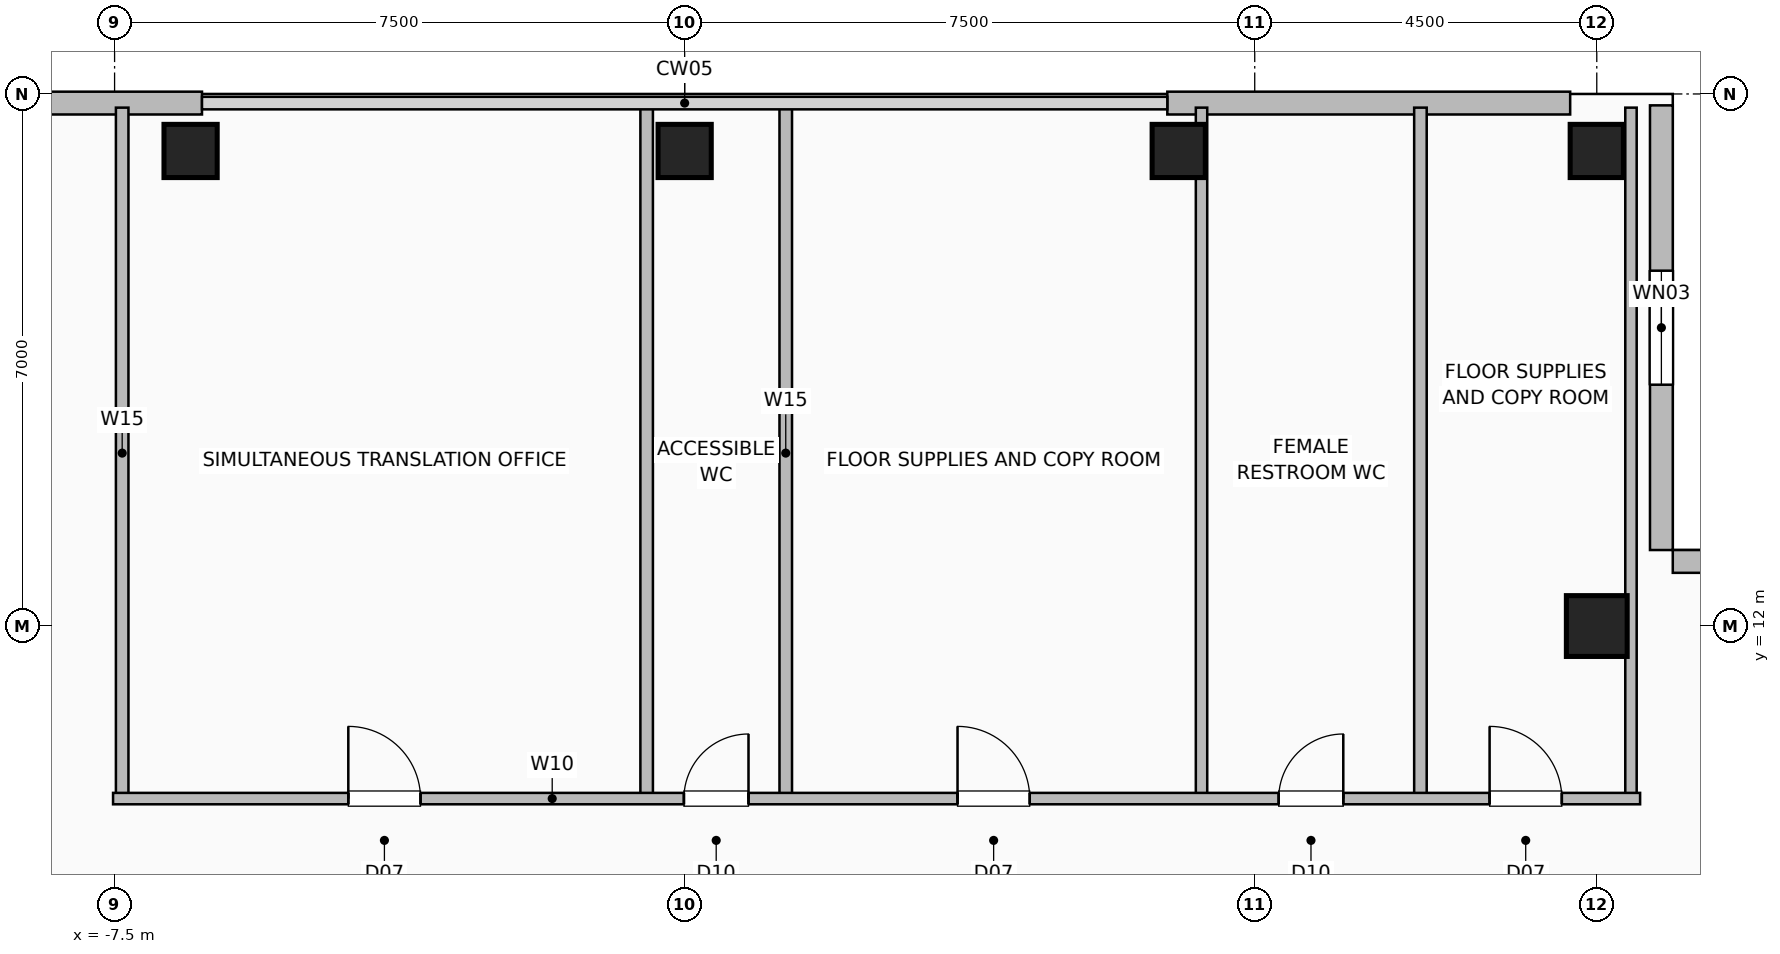
"""IFC4 building model, lengths in metres.
Left out: names, types, materials, properties, quantities, classifications, styles, units other than length and angle.
Written with IfcOpenShell. Run it as: python <this file> out.ifc"""

import sys

from ifc_helpers import new_model, si_unit, direction, frame, frame_2d, origin, origin_2d, place, context, subcontext, project, spatial, rectangle, hollow_rectangle, extrude, element, fill, save


model = new_model("IFC4")
c1 = context("Model", 3, precision=1e-05, world=origin(), true_north=direction((0.0, 1.0)))
c2 = subcontext(c1, "Body", "Model", "MODEL_VIEW")
j1 = project(units=[si_unit("LENGTHUNIT", "METRE"), si_unit("PLANEANGLEUNIT", "RADIAN")], contexts=[c1])
p1 = place(None, origin())
s1 = spatial("IfcSite", under=j1, at=p1, CompositionType="ELEMENT")
p2 = place(p1, origin())
s2 = spatial("IfcBuilding", under=s1, at=p2, CompositionType="ELEMENT")
p3 = place(p2, frame((0.0, 0.0, 246.8)))
s3 = spatial("IfcBuildingStorey", under=s2, at=p3, CompositionType="ELEMENT", Elevation=246.8)
for number, where, z_axis, x_axis in (
    (1, (-6.5, 18.25, 0.0), (0.0, 0.0, 1.0), (1.0, 0.0, 0.0)),
    (2, (0.0, 18.25, 0.0), (0.0, 0.0, 1.0), (1.0, 0.0, 0.0)),
    (3, (6.5, 18.25, 0.0), (0.0, 0.0, 1.0), (1.0, 0.0, 0.0)),
    (4, (12.0, 18.25, 0.0), (0.0, 0.0, 1.0), (1.0, 0.0, 0.0)),
):
    element("IfcColumn", number, at=place(p3, frame(where, z_axis=z_axis, x_axis=x_axis)), inside=s3, PredefinedType="COLUMN", context=c2, shape_type="SweptSolid", body=[
        extrude(hollow_rectangle(XDim=0.7, YDim=0.7, WallThickness=0.035, at=origin_2d()), origin(), (0.0, 0.0, 1.0), 3.6),
    ])
p4 = place(p3, frame((12.0, 12.0, 0.0), z_axis=(0.0, 0.0, 1.0), x_axis=(1.0, 0.0, 0.0)))
e5 = element("IfcColumn", 5, at=p4, inside=s3, PredefinedType="COLUMN", context=c2, shape_type="SweptSolid", body=[
    extrude(hollow_rectangle(XDim=0.8, YDim=0.8, WallThickness=0.04, at=origin_2d()), origin(), (0.0, 0.0, 1.0), 3.6),
])
for number, where, z_axis, x_axis in (
    (6, (-11.65, 18.88, 0.0), (0.0, 0.0, 1.0), (1.0, 0.0, 0.0)),
    (7, (6.35, 18.88, 0.0), (0.0, 0.0, 1.0), (1.0, 0.0, 0.0)),
):
    element("IfcWall", number, at=place(p3, frame(where, z_axis=z_axis, x_axis=x_axis)), inside=s3, PredefinedType="SOLIDWALL", context=c2, shape_type="SweptSolid", body=[
        extrude(rectangle(XDim=5.3, YDim=0.3, at=frame_2d((2.65, 0.0))), origin(), (0.0, 0.0, 1.0), 3.36),
    ])
p5 = place(p3, frame((12.85, 18.85, 0.0), z_axis=(0.0, 0.0, 1.0), x_axis=(0.0, -1.0, 0.0)))
e8 = element("IfcWall", 8, at=p5, inside=s3, PredefinedType="SOLIDWALL", context=c2, shape_type="SweptSolid", body=[
    extrude(rectangle(XDim=5.85, YDim=0.3, at=frame_2d((2.925, 0.0))), origin(), (0.0, 0.0, 1.0), 3.36),
])
p6 = place(p5, frame((2.175, 0.0, 0.9)))
e9 = element("IfcOpeningElement", 9, at=p6, cuts=e8, PredefinedType="OPENING", context=c2, shape_type="SweptSolid", body=[
    extrude(rectangle(XDim=1.5, YDim=1.8, at=frame_2d((0.75, 0.9))), frame((0.0, 0.16, 0.0), z_axis=(0.0, -1.0, 0.0), x_axis=(1.0, 0.0, 0.0)), (0.0, 0.0, 1.0), 0.32),
])
p7 = place(p3, frame((18.85, 12.85, 0.0), z_axis=(0.0, 0.0, 1.0), x_axis=(-1.0, 0.0, 0.0)))
e10 = element("IfcWall", 10, at=p7, inside=s3, PredefinedType="SOLIDWALL", context=c2, shape_type="SweptSolid", body=[
    extrude(rectangle(XDim=5.85, YDim=0.3, at=frame_2d((2.925, 0.0))), origin(), (0.0, 0.0, 1.0), 3.36),
])
for number, where, z_axis, x_axis in (
    (11, (1.33, 9.73, 0.0), (0.0, 0.0, 1.0), (0.0, 1.0, 0.0)),
    (12, (9.68, 9.73, 0.0), (0.0, 0.0, 1.0), (0.0, 1.0, 0.0)),
    (13, (-7.4, 9.73, 0.0), (0.0, 0.0, 1.0), (0.0, 1.0, 0.0)),
    (14, (-0.5, 9.73, 0.0), (0.0, 0.0, 1.0), (0.0, 1.0, 0.0)),
):
    element("IfcWall", number, at=place(p3, frame(where, z_axis=z_axis, x_axis=x_axis)), inside=s3, PredefinedType="PLUMBINGWALL", context=c2, shape_type="SweptSolid", body=[
        extrude(rectangle(XDim=9.09, YDim=0.165, at=frame_2d((4.545, 0.0))), origin(), (0.0, 0.0, 1.0), 3.36),
    ])
for number, where, z_axis, x_axis in (
    (15, (6.8, 9.73, 0.0), (0.0, 0.0, 1.0), (0.0, 1.0, 0.0)),
    (16, (12.45, 9.73, 0.0), (0.0, 0.0, 1.0), (0.0, 1.0, 0.0)),
):
    element("IfcWall", number, at=place(p3, frame(where, z_axis=z_axis, x_axis=x_axis)), inside=s3, PredefinedType="PARTITIONING", context=c2, shape_type="SweptSolid", body=[
        extrude(rectangle(XDim=9.09, YDim=0.15, at=frame_2d((4.545, 0.0))), origin(), (0.0, 0.0, 1.0), 3.36),
    ])
p8 = place(p3, frame((-7.52, 9.73, 0.0), z_axis=(0.0, 0.0, 1.0), x_axis=(1.0, 0.0, 0.0)))
e17 = element("IfcWall", 17, at=p8, inside=s3, PredefinedType="PARTITIONING", context=c2, shape_type="SweptSolid", body=[
    extrude(rectangle(XDim=20.09, YDim=0.15, at=frame_2d((10.045, 0.0))), origin(), (0.0, 0.0, 1.0), 3.36),
])
p9 = place(p8, frame((3.095, 0.0, 0.0)))
e18 = element("IfcOpeningElement", 18, at=p9, cuts=e17, PredefinedType="OPENING", context=c2, shape_type="SweptSolid", body=[
    extrude(rectangle(XDim=0.95, YDim=2.06, at=frame_2d((0.475, 1.03))), frame((0.0, 0.085, 0.0), z_axis=(0.0, -1.0, 0.0), x_axis=(1.0, 0.0, 0.0)), (0.0, 0.0, 1.0), 0.17),
])
p10 = place(p8, frame((7.51, 0.0, 0.0)))
e19 = element("IfcOpeningElement", 19, at=p10, cuts=e17, PredefinedType="OPENING", context=c2, shape_type="SweptSolid", body=[
    extrude(rectangle(XDim=0.85, YDim=2.05, at=frame_2d((0.425, 1.025))), frame((0.0, 0.085, 0.0), z_axis=(0.0, -1.0, 0.0), x_axis=(1.0, 0.0, 0.0)), (0.0, 0.0, 1.0), 0.17),
])
p11 = place(p8, frame((11.11, 0.0, 0.0)))
e20 = element("IfcOpeningElement", 20, at=p11, cuts=e17, PredefinedType="OPENING", context=c2, shape_type="SweptSolid", body=[
    extrude(rectangle(XDim=0.95, YDim=2.06, at=frame_2d((0.475, 1.03))), frame((0.0, 0.085, 0.0), z_axis=(0.0, -1.0, 0.0), x_axis=(1.0, 0.0, 0.0)), (0.0, 0.0, 1.0), 0.17),
])
p12 = place(p8, frame((15.335, 0.0, 0.0)))
e21 = element("IfcOpeningElement", 21, at=p12, cuts=e17, PredefinedType="OPENING", context=c2, shape_type="SweptSolid", body=[
    extrude(rectangle(XDim=0.85, YDim=2.05, at=frame_2d((0.425, 1.025))), frame((0.0, 0.085, 0.0), z_axis=(0.0, -1.0, 0.0), x_axis=(1.0, 0.0, 0.0)), (0.0, 0.0, 1.0), 0.17),
])
p13 = place(p8, frame((18.11, 0.0, 0.0)))
e22 = element("IfcOpeningElement", 22, at=p13, cuts=e17, PredefinedType="OPENING", context=c2, shape_type="SweptSolid", body=[
    extrude(rectangle(XDim=0.95, YDim=2.06, at=frame_2d((0.475, 1.03))), frame((0.0, 0.085, 0.0), z_axis=(0.0, -1.0, 0.0), x_axis=(1.0, 0.0, 0.0)), (0.0, 0.0, 1.0), 0.17),
])
p14 = place(p6, origin())
e23 = element("IfcWindow", 23, at=p14, inside=s3, PartitioningType="SINGLE_PANEL", PredefinedType="WINDOW", context=c2, shape_type="SweptSolid", body=[
    extrude(rectangle(XDim=1.5, YDim=1.8, at=frame_2d((0.75, 0.9))), frame((0.0, 0.03, 0.0), z_axis=(0.0, -1.0, 0.0), x_axis=(1.0, 0.0, 0.0)), (0.0, 0.0, 1.0), 0.06),
])
fill(e9, e23)
p15 = place(p9, origin())
e24 = element("IfcDoor", 24, at=p15, inside=s3, OperationType="SINGLE_SWING_LEFT", PredefinedType="DOOR", context=c2, shape_type="SweptSolid", body=[
    extrude(rectangle(XDim=0.95, YDim=2.06, at=frame_2d((0.475, 1.03))), frame((0.0, 0.025, 0.0), z_axis=(0.0, -1.0, 0.0), x_axis=(1.0, 0.0, 0.0)), (0.0, 0.0, 1.0), 0.05),
])
fill(e18, e24)
p16 = place(p10, origin())
e25 = element("IfcDoor", 25, at=p16, inside=s3, OperationType="SINGLE_SWING_RIGHT", PredefinedType="DOOR", context=c2, shape_type="SweptSolid", body=[
    extrude(rectangle(XDim=0.85, YDim=2.05, at=frame_2d((0.425, 1.025))), frame((0.0, 0.025, 0.0), z_axis=(0.0, -1.0, 0.0), x_axis=(1.0, 0.0, 0.0)), (0.0, 0.0, 1.0), 0.05),
])
fill(e19, e25)
p17 = place(p11, origin())
e26 = element("IfcDoor", 26, at=p17, inside=s3, OperationType="SINGLE_SWING_LEFT", PredefinedType="DOOR", context=c2, shape_type="SweptSolid", body=[
    extrude(rectangle(XDim=0.95, YDim=2.06, at=frame_2d((0.475, 1.03))), frame((0.0, 0.025, 0.0), z_axis=(0.0, -1.0, 0.0), x_axis=(1.0, 0.0, 0.0)), (0.0, 0.0, 1.0), 0.05),
])
fill(e20, e26)
p18 = place(p12, origin())
e27 = element("IfcDoor", 27, at=p18, inside=s3, OperationType="SINGLE_SWING_RIGHT", PredefinedType="DOOR", context=c2, shape_type="SweptSolid", body=[
    extrude(rectangle(XDim=0.85, YDim=2.05, at=frame_2d((0.425, 1.025))), frame((0.0, 0.025, 0.0), z_axis=(0.0, -1.0, 0.0), x_axis=(1.0, 0.0, 0.0)), (0.0, 0.0, 1.0), 0.05),
])
fill(e21, e27)
p19 = place(p13, origin())
e28 = element("IfcDoor", 28, at=p19, inside=s3, OperationType="SINGLE_SWING_LEFT", PredefinedType="DOOR", context=c2, shape_type="SweptSolid", body=[
    extrude(rectangle(XDim=0.95, YDim=2.06, at=frame_2d((0.475, 1.03))), frame((0.0, 0.025, 0.0), z_axis=(0.0, -1.0, 0.0), x_axis=(1.0, 0.0, 0.0)), (0.0, 0.0, 1.0), 0.05),
])
fill(e22, e28)
save(model, sys.argv[1])
